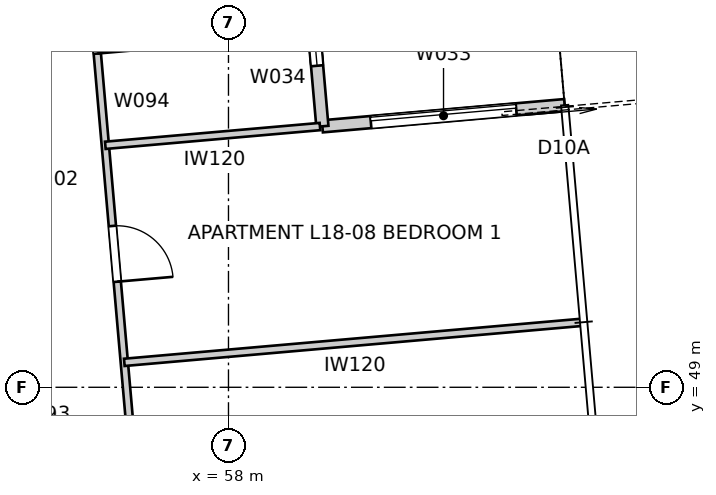
"""IFC4 building model, lengths in metres.
Left out: names, types, materials, properties, quantities, classifications, styles, units other than length and angle.
Written with IfcOpenShell. Run it as: python <this file> out.ifc"""

import sys

from ifc_helpers import new_model, si_unit, direction, frame, frame_2d, origin, place, context, subcontext, project, spatial, rectangle, extrude, element, fill, save


model = new_model("IFC4")
c1 = context("Model", 3, precision=1e-05, world=origin(), true_north=direction((0.0, 1.0)))
c2 = subcontext(c1, "Body", "Model", "MODEL_VIEW")
j1 = project(units=[si_unit("LENGTHUNIT", "METRE"), si_unit("PLANEANGLEUNIT", "RADIAN")], contexts=[c1])
p1 = place(None, origin())
s1 = spatial("IfcSite", under=j1, at=p1, CompositionType="ELEMENT")
p2 = place(p1, origin())
s2 = spatial("IfcBuilding", under=s1, at=p2, CompositionType="ELEMENT")
p3 = place(p2, frame((0.0, 0.0, 67.6)))
s3 = spatial("IfcBuildingStorey", under=s2, at=p3, CompositionType="ELEMENT", Elevation=67.6)
p4 = place(p3, frame((63.529, 53.641, 0.0), z_axis=(0.0, 0.0, 1.0), x_axis=(-0.99619418125, -0.087161650072, 0.0)))
e1 = element("IfcWall", 1, at=p4, inside=s3, PredefinedType="SOLIDWALL", context=c2, shape_type="SweptSolid", body=[
    extrude(rectangle(XDim=4.0, YDim=0.2, at=frame_2d((2.0, 0.0))), origin(), (0.0, 0.0, 1.0), 3.25),
])
p5 = place(p4, frame((0.8, 0.0, 0.0)))
e2 = element("IfcOpeningElement", 2, at=p5, cuts=e1, PredefinedType="OPENING", context=c2, shape_type="SweptSolid", body=[
    extrude(rectangle(XDim=2.4, YDim=2.1, at=frame_2d((1.2, 1.05))), frame((0.0, 0.11, 0.0), z_axis=(0.0, -1.0, 0.0), x_axis=(1.0, 0.0, 0.0)), (0.0, 0.0, 1.0), 0.22),
])
p6 = place(p3, frame((59.544, 53.292, 0.0), z_axis=(0.0, 0.0, 1.0), x_axis=(-0.087156350505, 0.99619464492, 0.0)))
e3 = element("IfcWall", 3, at=p6, inside=s3, PredefinedType="SOLIDWALL", context=c2, shape_type="SweptSolid", body=[
    extrude(rectangle(XDim=4.0, YDim=0.2, at=frame_2d((2.0, 0.0))), origin(), (0.0, 0.0, 1.0), 3.25),
])
p7 = place(p6, frame((1.0, 0.0, 0.45)))
e4 = element("IfcOpeningElement", 4, at=p7, cuts=e3, PredefinedType="OPENING", context=c2, shape_type="SweptSolid", body=[
    extrude(rectangle(XDim=2.0, YDim=1.8, at=frame_2d((1.0, 0.9))), frame((0.0, 0.11, 0.0), z_axis=(0.0, -1.0, 0.0), x_axis=(1.0, 0.0, 0.0)), (0.0, 0.0, 1.0), 0.22),
])
p8 = place(p3, frame((55.629, 56.925, 0.0), z_axis=(0.0, 0.0, 1.0), x_axis=(0.087169716747, -0.996193475426, 0.0)))
e5 = element("IfcWall", 5, at=p8, inside=s3, PredefinedType="PARTITIONING", context=c2, shape_type="SweptSolid", body=[
    extrude(rectangle(XDim=8.758, YDim=0.12, at=frame_2d((4.379, 0.0))), origin(), (0.0, 0.0, 1.0), 3.25),
])
p9 = place(p8, frame((1.525, 0.0, 0.0)))
e6 = element("IfcOpeningElement", 6, at=p9, cuts=e5, PredefinedType="OPENING", context=c2, shape_type="SweptSolid", body=[
    extrude(rectangle(XDim=0.92, YDim=2.34, at=frame_2d((0.46, 1.17))), frame((0.0, 0.07, 0.0), z_axis=(0.0, -1.0, 0.0), x_axis=(1.0, 0.0, 0.0)), (0.0, 0.0, 1.0), 0.14),
])
p10 = place(p8, frame((5.292, 0.0, 0.0)))
e7 = element("IfcOpeningElement", 7, at=p10, cuts=e5, PredefinedType="OPENING", context=c2, shape_type="SweptSolid", body=[
    extrude(rectangle(XDim=0.92, YDim=2.34, at=frame_2d((0.46, 1.17))), frame((0.0, 0.07, 0.0), z_axis=(0.0, -1.0, 0.0), x_axis=(1.0, 0.0, 0.0)), (0.0, 0.0, 1.0), 0.14),
])
p11 = place(p3, frame((63.802, 50.067, 0.0), z_axis=(0.0, 0.0, 1.0), x_axis=(-0.996194420069, -0.087158920508, 0.0)))
e8 = element("IfcWall", 8, at=p11, inside=s3, PredefinedType="PARTITIONING", context=c2, shape_type="SweptSolid", body=[
    extrude(rectangle(XDim=7.543, YDim=0.12, at=frame_2d((3.772, 0.0))), origin(), (0.0, 0.0, 1.0), 3.25),
])
p12 = place(p3, frame((55.975, 52.98, 0.0), z_axis=(0.0, 0.0, 1.0), x_axis=(0.996194166221, 0.087161821847, 0.0)))
e9 = element("IfcWall", 9, at=p12, inside=s3, PredefinedType="PARTITIONING", context=c2, shape_type="SweptSolid", body=[
    extrude(rectangle(XDim=3.543, YDim=0.12, at=frame_2d((1.771, 0.0))), origin(), (0.0, 0.0, 1.0), 3.25),
])
p13 = place(p5, origin())
e10 = element("IfcDoor", 10, at=p13, inside=s3, OperationType="SLIDING_TO_LEFT", PredefinedType="DOOR", context=c2, shape_type="SweptSolid", body=[
    extrude(rectangle(XDim=2.4, YDim=2.1, at=frame_2d((1.2, 1.05))), frame((0.0, 0.025, 0.0), z_axis=(0.0, -1.0, 0.0), x_axis=(1.0, 0.0, 0.0)), (0.0, 0.0, 1.0), 0.05),
])
fill(e2, e10)
p14 = place(p7, origin())
e11 = element("IfcWindow", 11, at=p14, inside=s3, PartitioningType="SINGLE_PANEL", PredefinedType="WINDOW", context=c2, shape_type="SweptSolid", body=[
    extrude(rectangle(XDim=2.0, YDim=1.8, at=frame_2d((1.0, 0.9))), frame((0.0, 0.03, 0.0), z_axis=(0.0, -1.0, 0.0), x_axis=(1.0, 0.0, 0.0)), (0.0, 0.0, 1.0), 0.06),
])
fill(e4, e11)
p15 = place(p9, origin())
e12 = element("IfcDoor", 12, at=p15, inside=s3, OperationType="SINGLE_SWING_RIGHT", PredefinedType="DOOR", context=c2, shape_type="SweptSolid", body=[
    extrude(rectangle(XDim=0.92, YDim=2.34, at=frame_2d((0.46, 1.17))), frame((0.0, 0.025, 0.0), z_axis=(0.0, -1.0, 0.0), x_axis=(1.0, 0.0, 0.0)), (0.0, 0.0, 1.0), 0.05),
])
fill(e6, e12)
p16 = place(p10, origin())
e13 = element("IfcDoor", 13, at=p16, inside=s3, OperationType="SINGLE_SWING_RIGHT", PredefinedType="DOOR", context=c2, shape_type="SweptSolid", body=[
    extrude(rectangle(XDim=0.92, YDim=2.34, at=frame_2d((0.46, 1.17))), frame((0.0, 0.025, 0.0), z_axis=(0.0, -1.0, 0.0), x_axis=(1.0, 0.0, 0.0)), (0.0, 0.0, 1.0), 0.05),
])
fill(e7, e13)
save(model, sys.argv[1])
